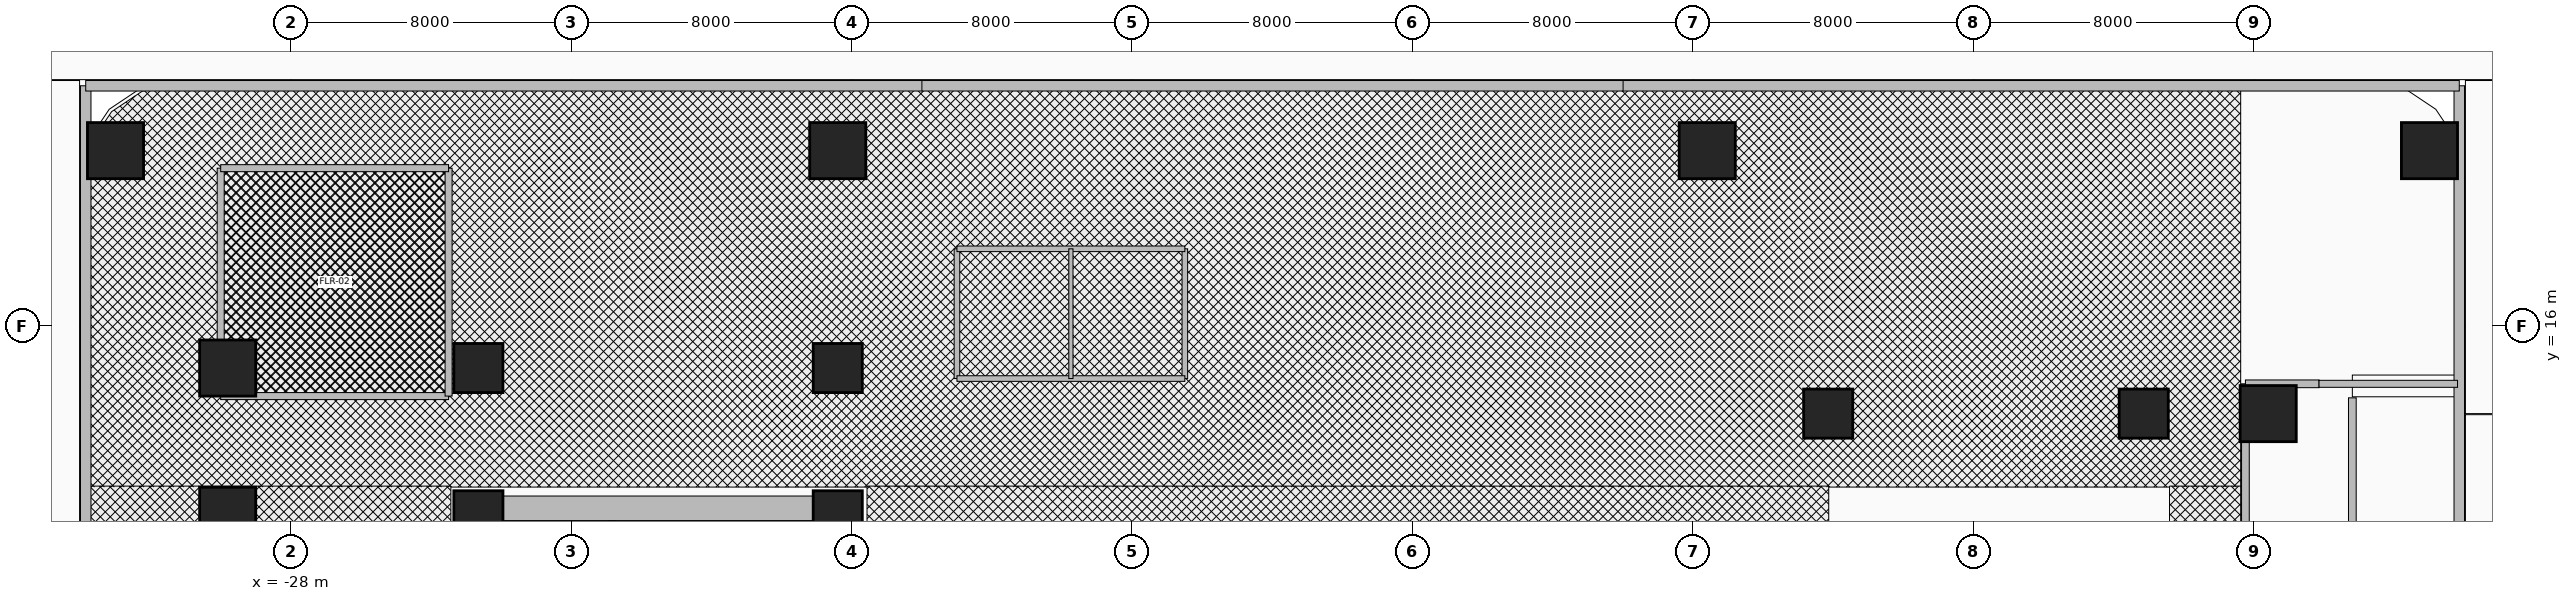
"""IFC4 building model, lengths in metres.
Left out: names, types, materials, properties, quantities, classifications, styles, units other than length and angle.
Written with IfcOpenShell. Run it as: python <this file> out.ifc"""

import sys

from ifc_helpers import new_model, si_unit, direction, frame, frame_2d, origin, origin_2d, place, context, subcontext, project, spatial, rectangle, extrude, source, transform, mapped, element, fill, save


model = new_model("IFC4")
c1 = context("Model", 3, precision=1e-05, world=origin(), true_north=direction((0.0, 1.0)))
c2 = subcontext(c1, "Body", "Model", "MODEL_VIEW")
j1 = project(units=[si_unit("LENGTHUNIT", "METRE"), si_unit("PLANEANGLEUNIT", "RADIAN")], contexts=[c1])
p1 = place(None, origin())
s1 = spatial("IfcSite", under=j1, at=p1, CompositionType="ELEMENT")
p2 = place(p1, origin())
s2 = spatial("IfcBuilding", under=s1, at=p2, CompositionType="ELEMENT")
p3 = place(p2, origin())
s3 = spatial("IfcBuildingStorey", under=s2, at=p3, CompositionType="ELEMENT", Elevation=0.0)
for number, where, z_axis, x_axis in (
    (1, (-22.16, 1.78, 0.0), (0.0, 0.0, 1.0), (0.0, 1.0, 0.0)),
    (2, (-18.83, 1.78, 0.0), (0.0, 0.0, 1.0), (0.0, 1.0, 0.0)),
):
    element("IfcWall", number, at=place(p3, frame(where, z_axis=z_axis, x_axis=x_axis)), inside=s3, PredefinedType="SHEAR", context=c2, shape_type="SweptSolid", body=[
        extrude(rectangle(XDim=8.67, YDim=0.22, at=frame_2d((4.335, 0.0))), origin(), (0.0, 0.0, 1.0), 4.92),
    ])
p4 = place(p3, frame((-22.65, 0.85, 0.0), z_axis=(0.0, 0.0, 1.0), x_axis=(0.0, 1.0, 0.0)))
e3 = element("IfcWall", 3, at=p4, inside=s3, PredefinedType="SHEAR", context=c2, shape_type="SweptSolid", body=[
    extrude(rectangle(XDim=10.3, YDim=0.7, at=frame_2d((5.15, 0.0))), origin(), (0.0, 0.0, 1.0), 4.92),
])
p5 = place(p3, frame((-22.65, 10.8, 0.0), z_axis=(0.0, 0.0, 1.0), x_axis=(1.0, 0.0, 0.0)))
e4 = element("IfcWall", 4, at=p5, inside=s3, PredefinedType="SHEAR", context=c2, shape_type="SweptSolid", body=[
    extrude(rectangle(XDim=10.25, YDim=0.7, at=frame_2d((5.125, 0.0))), origin(), (0.0, 0.0, 1.0), 4.92),
])
m1 = source(origin(), c2, "Body", "SweptSolid", [
    extrude(rectangle(XDim=1.6, YDim=1.6, at=origin_2d()), origin(), (0.0, 0.0, 1.0), 5.2),
])
p6 = place(p3, frame((-29.8, 10.6, 0.0), z_axis=(0.0, 0.0, 1.0), x_axis=(1.0, 0.0, 0.0)))
e5 = element("IfcColumn", 5, at=p6, inside=s3, PredefinedType="COLUMN", context=c2, shape_type="MappedRepresentation", body=[
    mapped(m1, transform((0.0, 0.0, 0.0), x_axis=(1.0, 0.0, 0.0), y_axis=(0.0, 1.0, 0.0), z_axis=(0.0, 0.0, 1.0), scale=1.0)),
])
m2 = source(origin(), c2, "Body", "SweptSolid", [
    extrude(rectangle(XDim=1.4, YDim=1.4, at=origin_2d()), origin(), (0.0, 0.0, 1.0), 5.2),
])
for number, where, z_axis, x_axis in (
    (6, (-22.65, 10.6, 0.0), (0.0, 0.0, 1.0), (1.0, 0.0, 0.0)),
    (7, (-12.4, 10.6, 0.0), (0.0, 0.0, 1.0), (1.0, 0.0, 0.0)),
):
    element("IfcColumn", number, at=place(p3, frame(where, z_axis=z_axis, x_axis=x_axis)), inside=s3, PredefinedType="COLUMN", context=c2, shape_type="MappedRepresentation", body=[
        mapped(m2, transform((0.0, 0.0, 0.0), x_axis=(1.0, 0.0, 0.0), y_axis=(0.0, 1.0, 0.0), z_axis=(0.0, 0.0, 1.0), scale=1.0)),
    ])
p7 = place(p3, frame((-29.8, 14.8, 0.0), z_axis=(0.0, 0.0, 1.0), x_axis=(1.0, 0.0, 0.0)))
e8 = element("IfcColumn", 8, at=p7, inside=s3, PredefinedType="COLUMN", context=c2, shape_type="MappedRepresentation", body=[
    mapped(m1, transform((0.0, 0.0, 0.0), x_axis=(1.0, 0.0, 0.0), y_axis=(0.0, 1.0, 0.0), z_axis=(0.0, 0.0, 1.0), scale=1.0)),
])
for number, where, z_axis, x_axis in (
    (9, (-22.65, 14.8, 0.0), (0.0, 0.0, 1.0), (1.0, 0.0, 0.0)),
    (10, (-12.4, 14.8, 0.0), (0.0, 0.0, 1.0), (1.0, 0.0, 0.0)),
    (11, (15.85, 13.5, 0.0), (0.0, 0.0, 1.0), (1.0, 0.0, 0.0)),
    (12, (24.85, 13.5, 0.0), (0.0, 0.0, 1.0), (1.0, 0.0, 0.0)),
):
    element("IfcColumn", number, at=place(p3, frame(where, z_axis=z_axis, x_axis=x_axis)), inside=s3, PredefinedType="COLUMN", context=c2, shape_type="MappedRepresentation", body=[
        mapped(m2, transform((0.0, 0.0, 0.0), x_axis=(1.0, 0.0, 0.0), y_axis=(0.0, 1.0, 0.0), z_axis=(0.0, 0.0, 1.0), scale=1.0)),
    ])
for number, where, z_axis, x_axis in (
    (13, (28.4, 13.5, 0.0), (0.0, 0.0, 1.0), (1.0, 0.0, 0.0)),
    (14, (-33.0, 21.0, 0.0), (0.0, 0.0, 1.0), (1.0, 0.0, 0.0)),
    (15, (-12.4, 21.0, 0.0), (0.0, 0.0, 1.0), (1.0, 0.0, 0.0)),
    (16, (12.4, 21.0, 0.0), (0.0, 0.0, 1.0), (1.0, 0.0, 0.0)),
    (17, (33.0, 21.0, 0.0), (0.0, 0.0, 1.0), (1.0, 0.0, 0.0)),
):
    element("IfcColumn", number, at=place(p3, frame(where, z_axis=z_axis, x_axis=x_axis)), inside=s3, PredefinedType="COLUMN", context=c2, shape_type="MappedRepresentation", body=[
        mapped(m1, transform((0.0, 0.0, 0.0), x_axis=(1.0, 0.0, 0.0), y_axis=(0.0, 1.0, 0.0), z_axis=(0.0, 0.0, 1.0), scale=1.0)),
    ])
p8 = place(p3, frame((-33.85, 9.98, 0.0), z_axis=(0.0, 0.0, 1.0), x_axis=(0.0, 1.0, 0.0)))
e18 = element("IfcWall", 18, at=p8, inside=s3, PredefinedType="SOLIDWALL", context=c2, shape_type="SweptSolid", body=[
    extrude(rectangle(XDim=12.87, YDim=0.3, at=frame_2d((6.435, 0.0))), origin(), (0.0, 0.0, 1.0), 4.92),
])
p9 = place(p3, frame((33.85, 9.98, 0.0), z_axis=(0.0, 0.0, 1.0), x_axis=(0.0, 1.0, 0.0)))
e19 = element("IfcWall", 19, at=p9, inside=s3, PredefinedType="SOLIDWALL", context=c2, shape_type="SweptSolid", body=[
    extrude(rectangle(XDim=12.87, YDim=0.3, at=frame_2d((6.435, 0.0))), origin(), (0.0, 0.0, 1.0), 4.92),
])
p10 = place(p9, frame((4.1, 0.0, 0.0)))
e20 = element("IfcOpeningElement", 20, at=p10, cuts=e19, PredefinedType="OPENING", context=c2, shape_type="SweptSolid", body=[
    extrude(rectangle(XDim=3.6, YDim=2.5, at=frame_2d((1.8, 1.25))), frame((0.0, 0.165, 0.0), z_axis=(0.0, -1.0, 0.0), x_axis=(1.0, 0.0, 0.0)), (0.0, 0.0, 1.0), 0.33),
])
for number, where, z_axis, x_axis in (
    (21, (-33.85, 22.85, 0.0), (0.0, 0.0, 1.0), (1.0, 0.0, 0.0)),
    (22, (9.98, 22.85, 0.0), (0.0, 0.0, 1.0), (1.0, 0.0, 0.0)),
):
    element("IfcWall", number, at=place(p3, frame(where, z_axis=z_axis, x_axis=x_axis)), inside=s3, PredefinedType="SOLIDWALL", context=c2, shape_type="SweptSolid", body=[
        extrude(rectangle(XDim=23.87, YDim=0.3, at=frame_2d((11.935, 0.0))), origin(), (0.0, 0.0, 1.0), 4.92),
    ])
p11 = place(p3, frame((-10.0, 22.85, 0.0), z_axis=(0.0, 0.0, 1.0), x_axis=(1.0, 0.0, 0.0)))
e23 = element("IfcWall", 23, at=p11, inside=s3, PredefinedType="SOLIDWALL", context=c2, shape_type="SweptSolid", body=[
    extrude(rectangle(XDim=20.0, YDim=0.3, at=frame_2d((10.0, 0.0))), origin(), (0.0, 0.0, 1.0), 4.92),
])
p12 = place(p11, frame((4.2, 0.0, 0.0)))
e24 = element("IfcOpeningElement", 24, at=p12, cuts=e23, PredefinedType="OPENING", context=c2, shape_type="SweptSolid", body=[
    extrude(rectangle(XDim=2.2, YDim=2.45, at=frame_2d((1.1, 1.225))), frame((0.0, 0.165, 0.0), z_axis=(0.0, -1.0, 0.0), x_axis=(1.0, 0.0, 0.0)), (0.0, 0.0, 1.0), 0.33),
])
p13 = place(p3, frame((27.75, -9.25, 0.0), z_axis=(0.0, 0.0, 1.0), x_axis=(0.0, 1.0, 0.0)))
e25 = element("IfcWall", 25, at=p13, inside=s3, PredefinedType="PARAPET", context=c2, shape_type="SweptSolid", body=[
    extrude(rectangle(XDim=23.6, YDim=0.22, at=frame_2d((11.8, 0.0))), origin(), (0.0, 0.0, 1.0), 1.35),
])
p14 = place(p3, frame((27.75, 14.35, 0.0), z_axis=(0.0, 0.0, 1.0), x_axis=(1.0, 0.0, 0.0)))
e26 = element("IfcWall", 26, at=p14, inside=s3, PredefinedType="PARAPET", context=c2, shape_type="SweptSolid", body=[
    extrude(rectangle(XDim=2.1, YDim=0.22, at=frame_2d((1.05, 0.0))), origin(), (0.0, 0.0, 1.0), 1.35),
])
p15 = place(p3, frame((30.8, -9.25, 0.0), z_axis=(0.0, 0.0, 1.0), x_axis=(0.0, 1.0, 0.0)))
e27 = element("IfcWall", 27, at=p15, inside=s3, PredefinedType="PARAPET", context=c2, shape_type="SweptSolid", body=[
    extrude(rectangle(XDim=23.2, YDim=0.22, at=frame_2d((11.6, 0.0))), origin(), (0.0, 0.0, 1.0), 1.35),
])
p16 = place(p3, frame((-30.0, 14.0, 0.0), z_axis=(0.0, 0.0, 1.0), x_axis=(1.0, 0.0, 0.0)))
e28 = element("IfcWall", 28, at=p16, inside=s3, PredefinedType="PARTITIONING", context=c2, shape_type="SweptSolid", body=[
    extrude(rectangle(XDim=6.5, YDim=0.2, at=frame_2d((3.25, 0.0))), origin(), (0.0, 0.0, 1.0), 4.356),
])
p17 = place(p16, frame((2.5, 0.0, 0.0)))
e29 = element("IfcOpeningElement", 29, at=p17, cuts=e28, PredefinedType="OPENING", context=c2, shape_type="SweptSolid", body=[
    extrude(rectangle(XDim=1.05, YDim=2.15, at=frame_2d((0.525, 1.075))), frame((0.0, 0.115, 0.0), z_axis=(0.0, -1.0, 0.0), x_axis=(1.0, 0.0, 0.0)), (0.0, 0.0, 1.0), 0.23),
])
p18 = place(p3, frame((-30.0, 14.0, 0.0), z_axis=(0.0, 0.0, 1.0), x_axis=(0.0, 1.0, 0.0)))
e30 = element("IfcWall", 30, at=p18, inside=s3, PredefinedType="PARTITIONING", context=c2, shape_type="SweptSolid", body=[
    extrude(rectangle(XDim=6.5, YDim=0.2, at=frame_2d((3.25, 0.0))), origin(), (0.0, 0.0, 1.0), 4.356),
])
p19 = place(p3, frame((-23.5, 14.0, 0.0), z_axis=(0.0, 0.0, 1.0), x_axis=(0.0, 1.0, 0.0)))
e31 = element("IfcWall", 31, at=p19, inside=s3, PredefinedType="PARTITIONING", context=c2, shape_type="SweptSolid", body=[
    extrude(rectangle(XDim=6.5, YDim=0.2, at=frame_2d((3.25, 0.0))), origin(), (0.0, 0.0, 1.0), 3.957),
])
p20 = place(p3, frame((-30.0, 20.5, 0.0), z_axis=(0.0, 0.0, 1.0), x_axis=(1.0, 0.0, 0.0)))
e32 = element("IfcWall", 32, at=p20, inside=s3, PredefinedType="PARTITIONING", context=c2, shape_type="SweptSolid", body=[
    extrude(rectangle(XDim=6.5, YDim=0.2, at=frame_2d((3.25, 0.0))), origin(), (0.0, 0.0, 1.0), 4.92),
])
for number, where, z_axis, x_axis in (
    (33, (-9.0, 14.5, 0.0), (0.0, 0.0, 1.0), (0.0, 1.0, 0.0)),
    (34, (-2.5, 14.5, 0.0), (0.0, 0.0, 1.0), (0.0, 1.0, 0.0)),
):
    element("IfcWall", number, at=place(p3, frame(where, z_axis=z_axis, x_axis=x_axis)), inside=s3, PredefinedType="PARTITIONING", context=c2, shape_type="SweptSolid", body=[
        extrude(rectangle(XDim=3.7, YDim=0.16, at=frame_2d((1.85, 0.0))), origin(), (0.0, 0.0, 1.0), 4.92),
    ])
p21 = place(p3, frame((-9.0, 14.5, 0.0), z_axis=(0.0, 0.0, 1.0), x_axis=(1.0, 0.0, 0.0)))
e35 = element("IfcWall", 35, at=p21, inside=s3, PredefinedType="PARTITIONING", context=c2, shape_type="SweptSolid", body=[
    extrude(rectangle(XDim=6.5, YDim=0.16, at=frame_2d((3.25, 0.0))), origin(), (0.0, 0.0, 1.0), 4.92),
])
p22 = place(p21, frame((0.3, 0.0, 0.0)))
e36 = element("IfcOpeningElement", 36, at=p22, cuts=e35, PredefinedType="OPENING", context=c2, shape_type="SweptSolid", body=[
    extrude(rectangle(XDim=0.85, YDim=2.1, at=frame_2d((0.425, 1.05))), frame((0.0, 0.095, 0.0), z_axis=(0.0, -1.0, 0.0), x_axis=(1.0, 0.0, 0.0)), (0.0, 0.0, 1.0), 0.19),
])
p23 = place(p21, frame((3.5, 0.0, 0.0)))
e37 = element("IfcOpeningElement", 37, at=p23, cuts=e35, PredefinedType="OPENING", context=c2, shape_type="SweptSolid", body=[
    extrude(rectangle(XDim=0.85, YDim=2.1, at=frame_2d((0.425, 1.05))), frame((0.0, 0.095, 0.0), z_axis=(0.0, -1.0, 0.0), x_axis=(1.0, 0.0, 0.0)), (0.0, 0.0, 1.0), 0.19),
])
p24 = place(p3, frame((-9.0, 18.2, 0.0), z_axis=(0.0, 0.0, 1.0), x_axis=(1.0, 0.0, 0.0)))
e38 = element("IfcWall", 38, at=p24, inside=s3, PredefinedType="PARTITIONING", context=c2, shape_type="SweptSolid", body=[
    extrude(rectangle(XDim=6.5, YDim=0.16, at=frame_2d((3.25, 0.0))), origin(), (0.0, 0.0, 1.0), 4.92),
])
p25 = place(p3, frame((-5.75, 14.5, 0.0), z_axis=(0.0, 0.0, 1.0), x_axis=(0.0, 1.0, 0.0)))
e39 = element("IfcWall", 39, at=p25, inside=s3, PredefinedType="PARTITIONING", context=c2, shape_type="SweptSolid", body=[
    extrude(rectangle(XDim=3.7, YDim=0.12, at=frame_2d((1.85, 0.0))), origin(), (0.0, 0.0, 1.0), 4.92),
])
p26 = place(p3, frame((29.85, 14.35, 0.0), z_axis=(0.0, 0.0, 1.0), x_axis=(1.0, 0.0, 0.0)))
e40 = element("IfcWall", 40, at=p26, inside=s3, PredefinedType="MOVABLE", context=c2, shape_type="SweptSolid", body=[
    extrude(rectangle(XDim=3.95, YDim=0.2, at=frame_2d((1.975, 0.0))), origin(), (0.0, 0.0, 1.0), 4.356),
])
p27 = place(p26, frame((0.175, 0.0, 0.0)))
e41 = element("IfcOpeningElement", 41, at=p27, cuts=e40, PredefinedType="OPENING", context=c2, shape_type="SweptSolid", body=[
    extrude(rectangle(XDim=3.6, YDim=2.5, at=frame_2d((1.8, 1.25))), frame((0.0, 0.115, 0.0), z_axis=(0.0, -1.0, 0.0), x_axis=(1.0, 0.0, 0.0)), (0.0, 0.0, 1.0), 0.23),
])
p28 = place(p12, origin())
e42 = element("IfcDoor", 42, at=p28, inside=s3, OperationType="SINGLE_SWING_LEFT", PredefinedType="DOOR", context=c2, shape_type="SweptSolid", body=[
    extrude(rectangle(XDim=2.2, YDim=2.45, at=frame_2d((1.1, 1.225))), frame((0.0, 0.025, 0.0), z_axis=(0.0, -1.0, 0.0), x_axis=(1.0, 0.0, 0.0)), (0.0, 0.0, 1.0), 0.05),
])
fill(e24, e42)
p29 = place(p10, origin())
e43 = element("IfcDoor", 43, at=p29, inside=s3, OperationType="ROLLINGUP", PredefinedType="GATE", context=c2, shape_type="SweptSolid", body=[
    extrude(rectangle(XDim=3.6, YDim=2.5, at=frame_2d((1.8, 1.25))), frame((0.0, 0.025, 0.0), z_axis=(0.0, -1.0, 0.0), x_axis=(1.0, 0.0, 0.0)), (0.0, 0.0, 1.0), 0.05),
])
fill(e20, e43)
p30 = place(p17, frame((1.05, 0.0, 0.0), z_axis=(0.0, 0.0, 1.0), x_axis=(-1.0, 0.0, 0.0)))
e44 = element("IfcDoor", 44, at=p30, inside=s3, OperationType="SINGLE_SWING_LEFT", PredefinedType="DOOR", context=c2, shape_type="SweptSolid", body=[
    extrude(rectangle(XDim=1.05, YDim=2.15, at=frame_2d((0.525, 1.075))), frame((0.0, 0.025, 0.0), z_axis=(0.0, -1.0, 0.0), x_axis=(1.0, 0.0, 0.0)), (0.0, 0.0, 1.0), 0.05),
])
fill(e29, e44)
p31 = place(p22, origin())
e45 = element("IfcDoor", 45, at=p31, inside=s3, OperationType="SINGLE_SWING_RIGHT", PredefinedType="DOOR", context=c2, shape_type="SweptSolid", body=[
    extrude(rectangle(XDim=0.85, YDim=2.1, at=frame_2d((0.425, 1.05))), frame((0.0, 0.025, 0.0), z_axis=(0.0, -1.0, 0.0), x_axis=(1.0, 0.0, 0.0)), (0.0, 0.0, 1.0), 0.05),
])
fill(e36, e45)
p32 = place(p23, origin())
e46 = element("IfcDoor", 46, at=p32, inside=s3, OperationType="SINGLE_SWING_LEFT", PredefinedType="DOOR", context=c2, shape_type="SweptSolid", body=[
    extrude(rectangle(XDim=0.85, YDim=2.1, at=frame_2d((0.425, 1.05))), frame((0.0, 0.025, 0.0), z_axis=(0.0, -1.0, 0.0), x_axis=(1.0, 0.0, 0.0)), (0.0, 0.0, 1.0), 0.05),
])
fill(e37, e46)
p33 = place(p27, origin())
e47 = element("IfcDoor", 47, at=p33, inside=s3, OperationType="ROLLINGUP", PredefinedType="GATE", context=c2, shape_type="SweptSolid", body=[
    extrude(rectangle(XDim=3.6, YDim=2.5, at=frame_2d((1.8, 1.25))), frame((0.0, 0.025, 0.0), z_axis=(0.0, -1.0, 0.0), x_axis=(1.0, 0.0, 0.0)), (0.0, 0.0, 1.0), 0.05),
])
fill(e41, e47)
save(model, sys.argv[1])
